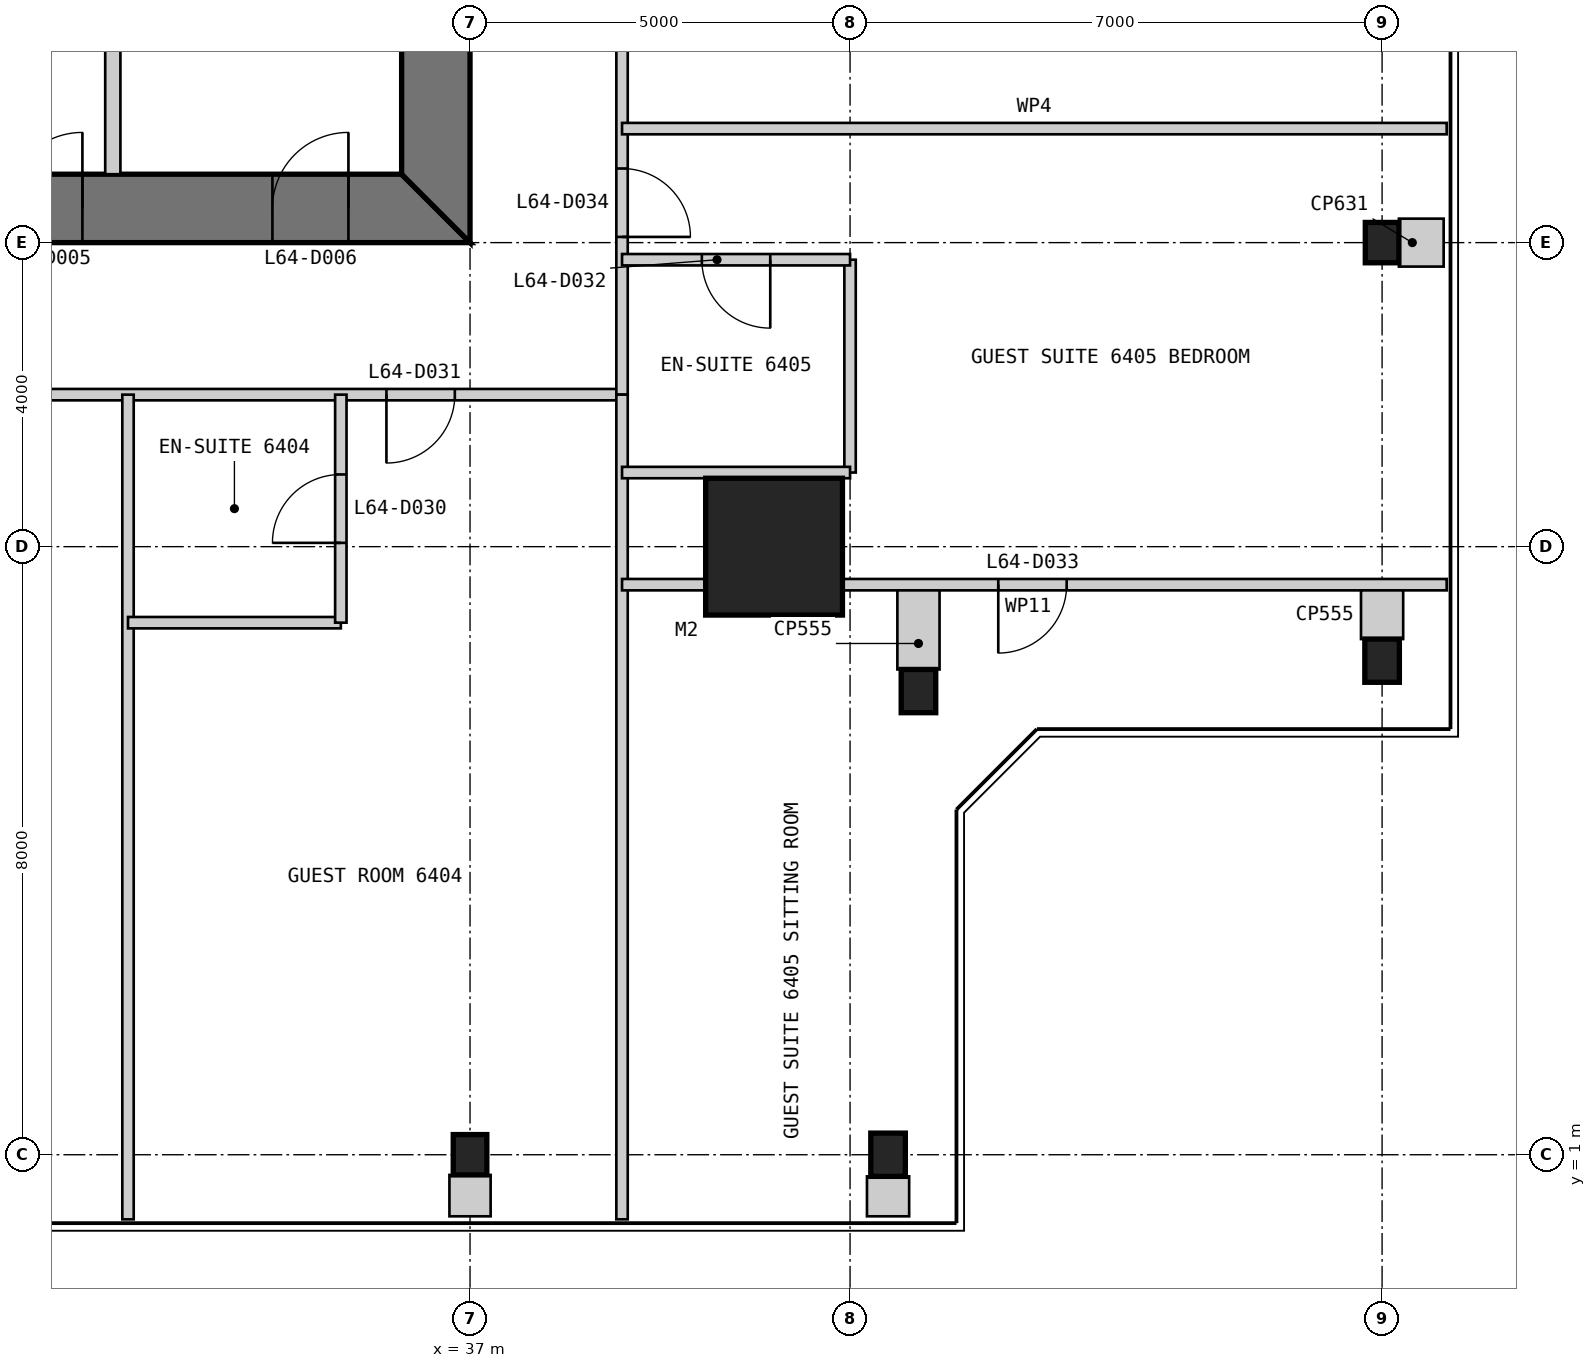
"""IFC4 building model, lengths in metres.
Left out: names, types, materials, properties, quantities, classifications, styles, units other than length and angle.
Written with IfcOpenShell. Run it as: python <this file> out.ifc"""

import sys

from ifc_helpers import new_model, si_unit, direction, frame, frame_2d, origin, origin_2d, place, context, subcontext, project, spatial, polyline, rectangle, i_section, outline, extrude, element, fill, save


model = new_model("IFC4")
c1 = context("Model", 3, precision=1e-05, world=origin(), true_north=direction((0.0, 1.0)))
c2 = subcontext(c1, "Body", "Model", "MODEL_VIEW")
j1 = project(units=[si_unit("LENGTHUNIT", "METRE"), si_unit("PLANEANGLEUNIT", "RADIAN")], contexts=[c1])
p1 = place(None, origin())
s1 = spatial("IfcSite", under=j1, at=p1, CompositionType="ELEMENT")
p2 = place(p1, origin())
s2 = spatial("IfcBuilding", under=s1, at=p2, CompositionType="ELEMENT")
p3 = place(p2, frame((0.0, 0.0, 269.6)))
s3 = spatial("IfcBuildingStorey", under=s2, at=p3, CompositionType="ELEMENT", Elevation=269.6)
p4 = place(p3, frame((41.0, 9.0, 0.0), z_axis=(0.0, 0.0, 1.0), x_axis=(1.0, 0.0, 0.0)))
e1 = element("IfcColumn", 1, at=p4, inside=s3, PredefinedType="COLUMN", context=c2, shape_type="SweptSolid", body=[
    extrude(rectangle(XDim=1.8, YDim=1.8, at=origin_2d()), origin(), (0.0, 0.0, 1.0), 3.4),
])
p5 = place(p3, frame((37.0, 1.0, 0.0), z_axis=(0.0, 0.0, 1.0), x_axis=(1.0, 0.0, 0.0)))
e2 = element("IfcColumn", 2, at=p5, inside=s3, PredefinedType="COLUMN", context=c2, shape_type="SweptSolid", body=[
    extrude(i_section(OverallWidth=0.442, OverallDepth=0.531, WebThickness=0.066, FlangeThickness=0.106, at=origin_2d()), origin(), (0.0, 0.0, 1.0), 3.4),
])
for number, where, z_axis, x_axis in (
    (3, (42.5, 1.0, 0.0), (0.0, 0.0, 1.0), (1.0, 0.0, 0.0)),
    (4, (42.9, 7.1, 0.0), (0.0, 0.0, 1.0), (1.0, 0.0, 0.0)),
    (5, (49.0, 7.5, 0.0), (0.0, 0.0, 1.0), (1.0, 0.0, 0.0)),
):
    element("IfcColumn", number, at=place(p3, frame(where, z_axis=z_axis, x_axis=x_axis)), inside=s3, PredefinedType="COLUMN", context=c2, shape_type="SweptSolid", body=[
        extrude(i_section(OverallWidth=0.455, OverallDepth=0.569, WebThickness=0.078, FlangeThickness=0.125, at=origin_2d()), origin(), (0.0, 0.0, 1.0), 3.4),
    ])
p6 = place(p3, frame((49.0, 13.0, 0.0), z_axis=(0.0, 0.0, 1.0), x_axis=(1.0, 0.0, 0.0)))
e6 = element("IfcColumn", 6, at=p6, inside=s3, PredefinedType="COLUMN", context=c2, shape_type="SweptSolid", body=[
    extrude(i_section(OverallWidth=0.442, OverallDepth=0.531, WebThickness=0.066, FlangeThickness=0.106, at=origin_2d()), origin(), (0.0, 0.0, 1.0), 3.4),
])
p7 = place(p3, frame((13.0, 13.45, 0.0), z_axis=(0.0, 0.0, 1.0), x_axis=(1.0, 0.0, 0.0)))
e7 = element("IfcWall", 7, at=p7, inside=s3, PredefinedType="SHEAR", context=c2, shape_type="SweptSolid", body=[
    extrude(outline(polyline([(0.0, -0.45), (24.0, -0.45), (23.1, 0.45), (0.9, 0.45), (0.0, -0.45)])), origin(), (0.0, 0.0, 1.0), 3.4),
])
p8 = place(p7, frame((4.9, 0.0, 0.0)))
e8 = element("IfcOpeningElement", 8, at=p8, cuts=e7, PredefinedType="OPENING", context=c2, shape_type="SweptSolid", body=[
    extrude(rectangle(XDim=1.0, YDim=2.2, at=frame_2d((0.5, 1.1))), frame((0.0, 0.46, 0.0), z_axis=(0.0, -1.0, 0.0), x_axis=(1.0, 0.0, 0.0)), (0.0, 0.0, 1.0), 0.92),
])
p9 = place(p7, frame((8.9, 0.0, 0.0)))
e9 = element("IfcOpeningElement", 9, at=p9, cuts=e7, PredefinedType="OPENING", context=c2, shape_type="SweptSolid", body=[
    extrude(rectangle(XDim=1.1, YDim=2.2, at=frame_2d((0.55, 1.1))), frame((0.0, 0.46, 0.0), z_axis=(0.0, -1.0, 0.0), x_axis=(1.0, 0.0, 0.0)), (0.0, 0.0, 1.0), 0.92),
])
p10 = place(p7, frame((15.05, 0.0, 0.0)))
e10 = element("IfcOpeningElement", 10, at=p10, cuts=e7, PredefinedType="OPENING", context=c2, shape_type="SweptSolid", body=[
    extrude(rectangle(XDim=0.9, YDim=2.2, at=frame_2d((0.45, 1.1))), frame((0.0, 0.46, 0.0), z_axis=(0.0, -1.0, 0.0), x_axis=(1.0, 0.0, 0.0)), (0.0, 0.0, 1.0), 0.92),
])
p11 = place(p7, frame((17.9, 0.0, 0.0)))
e11 = element("IfcOpeningElement", 11, at=p11, cuts=e7, PredefinedType="OPENING", context=c2, shape_type="SweptSolid", body=[
    extrude(rectangle(XDim=1.0, YDim=2.2, at=frame_2d((0.5, 1.1))), frame((0.0, 0.46, 0.0), z_axis=(0.0, -1.0, 0.0), x_axis=(1.0, 0.0, 0.0)), (0.0, 0.0, 1.0), 0.92),
])
p12 = place(p7, frame((21.4, 0.0, 0.0)))
e12 = element("IfcOpeningElement", 12, at=p12, cuts=e7, PredefinedType="OPENING", context=c2, shape_type="SweptSolid", body=[
    extrude(rectangle(XDim=1.0, YDim=2.2, at=frame_2d((0.5, 1.1))), frame((0.0, 0.46, 0.0), z_axis=(0.0, -1.0, 0.0), x_axis=(1.0, 0.0, 0.0)), (0.0, 0.0, 1.0), 0.92),
])
p13 = place(p3, frame((36.55, 13.9, 0.0), z_axis=(0.0, 0.0, 1.0), x_axis=(0.0, 1.0, 0.0)))
e13 = element("IfcWall", 13, at=p13, inside=s3, PredefinedType="SHEAR", context=c2, shape_type="SweptSolid", body=[
    extrude(outline(polyline([(-0.9, -0.45), (23.1, -0.45), (22.2, 0.45), (0.0, 0.45), (-0.9, -0.45)])), origin(), (0.0, 0.0, 1.0), 3.4),
])
p14 = place(p13, frame((20.2, 0.0, 0.0)))
e14 = element("IfcOpeningElement", 14, at=p14, cuts=e13, PredefinedType="OPENING", context=c2, shape_type="SweptSolid", body=[
    extrude(rectangle(XDim=1.0, YDim=2.2, at=frame_2d((0.5, 1.1))), frame((0.0, 0.46, 0.0), z_axis=(0.0, -1.0, 0.0), x_axis=(1.0, 0.0, 0.0)), (0.0, 0.0, 1.0), 0.92),
])
p15 = place(p13, frame((17.25, 0.0, 0.0)))
e15 = element("IfcOpeningElement", 15, at=p15, cuts=e13, PredefinedType="OPENING", context=c2, shape_type="SweptSolid", body=[
    extrude(rectangle(XDim=0.9, YDim=2.2, at=frame_2d((0.45, 1.1))), frame((0.0, 0.46, 0.0), z_axis=(0.0, -1.0, 0.0), x_axis=(1.0, 0.0, 0.0)), (0.0, 0.0, 1.0), 0.92),
])
p16 = place(p3, frame((32.3, 13.9, 0.0), z_axis=(0.0, 0.0, 1.0), x_axis=(0.0, 1.0, 0.0)))
e16 = element("IfcWall", 16, at=p16, inside=s3, PredefinedType="PARTITIONING", context=c2, shape_type="SweptSolid", body=[
    extrude(rectangle(XDim=6.1, YDim=0.2, at=frame_2d((3.05, 0.0))), origin(), (0.0, 0.0, 1.0), 3.2),
])
p17 = place(p3, frame((11.0, 11.0, 0.0), z_axis=(0.0, 0.0, 1.0), x_axis=(1.0, 0.0, 0.0)))
e17 = element("IfcWall", 17, at=p17, inside=s3, PredefinedType="PARTITIONING", context=c2, shape_type="SweptSolid", body=[
    extrude(rectangle(XDim=28.0, YDim=0.15, at=frame_2d((14.0, 0.0))), origin(), (0.0, 0.0, 1.0), 2.844),
])
p18 = place(p17, frame((1.9, 0.0, 0.0)))
e18 = element("IfcOpeningElement", 18, at=p18, cuts=e17, PredefinedType="OPENING", context=c2, shape_type="SweptSolid", body=[
    extrude(rectangle(XDim=0.9, YDim=2.1, at=frame_2d((0.45, 1.05))), frame((0.0, 0.085, 0.0), z_axis=(0.0, -1.0, 0.0), x_axis=(1.0, 0.0, 0.0)), (0.0, 0.0, 1.0), 0.17),
])
p19 = place(p17, frame((4.7, 0.0, 0.0)))
e19 = element("IfcOpeningElement", 19, at=p19, cuts=e17, PredefinedType="OPENING", context=c2, shape_type="SweptSolid", body=[
    extrude(rectangle(XDim=1.0, YDim=2.1, at=frame_2d((0.5, 1.05))), frame((0.0, 0.085, 0.0), z_axis=(0.0, -1.0, 0.0), x_axis=(1.0, 0.0, 0.0)), (0.0, 0.0, 1.0), 0.17),
])
p20 = place(p17, frame((13.3, 0.0, 0.0)))
e20 = element("IfcOpeningElement", 20, at=p20, cuts=e17, PredefinedType="OPENING", context=c2, shape_type="SweptSolid", body=[
    extrude(rectangle(XDim=0.9, YDim=2.1, at=frame_2d((0.45, 1.05))), frame((0.0, 0.085, 0.0), z_axis=(0.0, -1.0, 0.0), x_axis=(1.0, 0.0, 0.0)), (0.0, 0.0, 1.0), 0.17),
])
p21 = place(p17, frame((24.9, 0.0, 0.0)))
e21 = element("IfcOpeningElement", 21, at=p21, cuts=e17, PredefinedType="OPENING", context=c2, shape_type="SweptSolid", body=[
    extrude(rectangle(XDim=0.9, YDim=2.1, at=frame_2d((0.45, 1.05))), frame((0.0, 0.085, 0.0), z_axis=(0.0, -1.0, 0.0), x_axis=(1.0, 0.0, 0.0)), (0.0, 0.0, 1.0), 0.17),
])
p22 = place(p3, frame((32.5, 0.15, 0.0), z_axis=(0.0, 0.0, 1.0), x_axis=(0.0, 1.0, 0.0)))
e22 = element("IfcWall", 22, at=p22, inside=s3, PredefinedType="PARTITIONING", context=c2, shape_type="SweptSolid", body=[
    extrude(rectangle(XDim=10.85, YDim=0.15, at=frame_2d((5.425, 0.0))), origin(), (0.0, 0.0, 1.0), 3.25),
])
p23 = place(p3, frame((32.5, 8.0, 0.0), z_axis=(0.0, 0.0, 1.0), x_axis=(1.0, 0.0, 0.0)))
e23 = element("IfcWall", 23, at=p23, inside=s3, PredefinedType="PARTITIONING", context=c2, shape_type="SweptSolid", body=[
    extrude(rectangle(XDim=2.8, YDim=0.15, at=frame_2d((1.4, 0.0))), origin(), (0.0, 0.0, 1.0), 3.25),
])
p24 = place(p3, frame((35.3, 8.0, 0.0), z_axis=(0.0, 0.0, 1.0), x_axis=(0.0, 1.0, 0.0)))
e24 = element("IfcWall", 24, at=p24, inside=s3, PredefinedType="PARTITIONING", context=c2, shape_type="SweptSolid", body=[
    extrude(rectangle(XDim=3.0, YDim=0.15, at=frame_2d((1.5, 0.0))), origin(), (0.0, 0.0, 1.0), 3.25),
])
p25 = place(p24, frame((1.05, 0.0, 0.0)))
e25 = element("IfcOpeningElement", 25, at=p25, cuts=e24, PredefinedType="OPENING", context=c2, shape_type="SweptSolid", body=[
    extrude(rectangle(XDim=0.9, YDim=2.1, at=frame_2d((0.45, 1.05))), frame((0.0, 0.085, 0.0), z_axis=(0.0, -1.0, 0.0), x_axis=(1.0, 0.0, 0.0)), (0.0, 0.0, 1.0), 0.17),
])
p26 = place(p3, frame((39.0, 11.0, 0.0), z_axis=(0.0, 0.0, 1.0), x_axis=(0.0, 1.0, 0.0)))
e26 = element("IfcWall", 26, at=p26, inside=s3, PredefinedType="PARTITIONING", context=c2, shape_type="SweptSolid", body=[
    extrude(rectangle(XDim=28.0, YDim=0.15, at=frame_2d((14.0, 0.0))), origin(), (0.0, 0.0, 1.0), 2.844),
])
p27 = place(p26, frame((2.075, 0.0, 0.0)))
e27 = element("IfcOpeningElement", 27, at=p27, cuts=e26, PredefinedType="OPENING", context=c2, shape_type="SweptSolid", body=[
    extrude(rectangle(XDim=0.9, YDim=2.1, at=frame_2d((0.45, 1.05))), frame((0.0, 0.085, 0.0), z_axis=(0.0, -1.0, 0.0), x_axis=(1.0, 0.0, 0.0)), (0.0, 0.0, 1.0), 0.17),
])
p28 = place(p26, frame((5.2, 0.0, 0.0)))
e28 = element("IfcOpeningElement", 28, at=p28, cuts=e26, PredefinedType="OPENING", context=c2, shape_type="SweptSolid", body=[
    extrude(rectangle(XDim=0.9, YDim=2.1, at=frame_2d((0.45, 1.05))), frame((0.0, 0.085, 0.0), z_axis=(0.0, -1.0, 0.0), x_axis=(1.0, 0.0, 0.0)), (0.0, 0.0, 1.0), 0.17),
])
p29 = place(p26, frame((13.3, 0.0, 0.0)))
e29 = element("IfcOpeningElement", 29, at=p29, cuts=e26, PredefinedType="OPENING", context=c2, shape_type="SweptSolid", body=[
    extrude(rectangle(XDim=0.9, YDim=2.1, at=frame_2d((0.45, 1.05))), frame((0.0, 0.085, 0.0), z_axis=(0.0, -1.0, 0.0), x_axis=(1.0, 0.0, 0.0)), (0.0, 0.0, 1.0), 0.17),
])
p30 = place(p26, frame((24.9, 0.0, 0.0)))
e30 = element("IfcOpeningElement", 30, at=p30, cuts=e26, PredefinedType="OPENING", context=c2, shape_type="SweptSolid", body=[
    extrude(rectangle(XDim=0.9, YDim=2.1, at=frame_2d((0.45, 1.05))), frame((0.0, 0.085, 0.0), z_axis=(0.0, -1.0, 0.0), x_axis=(1.0, 0.0, 0.0)), (0.0, 0.0, 1.0), 0.17),
])
p31 = place(p3, frame((39.0, 0.15, 0.0), z_axis=(0.0, 0.0, 1.0), x_axis=(0.0, 1.0, 0.0)))
e31 = element("IfcWall", 31, at=p31, inside=s3, PredefinedType="PARTITIONING", context=c2, shape_type="SweptSolid", body=[
    extrude(rectangle(XDim=10.85, YDim=0.15, at=frame_2d((5.425, 0.0))), origin(), (0.0, 0.0, 1.0), 2.844),
])
p32 = place(p3, frame((42.0, 9.975, 0.0), z_axis=(0.0, 0.0, 1.0), x_axis=(0.0, 1.0, 0.0)))
e32 = element("IfcWall", 32, at=p32, inside=s3, PredefinedType="PARTITIONING", context=c2, shape_type="SweptSolid", body=[
    extrude(rectangle(XDim=2.8, YDim=0.15, at=frame_2d((1.4, 0.0))), origin(), (0.0, 0.0, 1.0), 3.25),
])
p33 = place(p3, frame((42.0, 12.775, 0.0), z_axis=(0.0, 0.0, 1.0), x_axis=(-1.0, 0.0, 0.0)))
e33 = element("IfcWall", 33, at=p33, inside=s3, PredefinedType="PARTITIONING", context=c2, shape_type="SweptSolid", body=[
    extrude(rectangle(XDim=3.0, YDim=0.15, at=frame_2d((1.5, 0.0))), origin(), (0.0, 0.0, 1.0), 3.25),
])
p34 = place(p33, frame((1.05, 0.0, 0.0)))
e34 = element("IfcOpeningElement", 34, at=p34, cuts=e33, PredefinedType="OPENING", context=c2, shape_type="SweptSolid", body=[
    extrude(rectangle(XDim=0.9, YDim=2.1, at=frame_2d((0.45, 1.05))), frame((0.0, 0.085, 0.0), z_axis=(0.0, -1.0, 0.0), x_axis=(1.0, 0.0, 0.0)), (0.0, 0.0, 1.0), 0.17),
])
p35 = place(p3, frame((42.0, 9.975, 0.0), z_axis=(0.0, 0.0, 1.0), x_axis=(-1.0, 0.0, 0.0)))
e35 = element("IfcWall", 35, at=p35, inside=s3, PredefinedType="PARTITIONING", context=c2, shape_type="SweptSolid", body=[
    extrude(rectangle(XDim=3.0, YDim=0.15, at=frame_2d((1.5, 0.0))), origin(), (0.0, 0.0, 1.0), 3.25),
])
p36 = place(p3, frame((49.85, 8.5, 0.0), z_axis=(0.0, 0.0, 1.0), x_axis=(-1.0, 0.0, 0.0)))
e36 = element("IfcWall", 36, at=p36, inside=s3, PredefinedType="PARTITIONING", context=c2, shape_type="SweptSolid", body=[
    extrude(rectangle(XDim=10.85, YDim=0.15, at=frame_2d((5.425, 0.0))), origin(), (0.0, 0.0, 1.0), 3.25),
])
p37 = place(p36, frame((5.0, 0.0, 0.0)))
e37 = element("IfcOpeningElement", 37, at=p37, cuts=e36, PredefinedType="OPENING", context=c2, shape_type="SweptSolid", body=[
    extrude(rectangle(XDim=0.9, YDim=2.1, at=frame_2d((0.45, 1.05))), frame((0.0, 0.085, 0.0), z_axis=(0.0, -1.0, 0.0), x_axis=(1.0, 0.0, 0.0)), (0.0, 0.0, 1.0), 0.17),
])
p38 = place(p3, frame((49.85, 14.5, 0.0), z_axis=(0.0, 0.0, 1.0), x_axis=(-1.0, 0.0, 0.0)))
e38 = element("IfcWall", 38, at=p38, inside=s3, PredefinedType="PARTITIONING", context=c2, shape_type="SweptSolid", body=[
    extrude(rectangle(XDim=10.85, YDim=0.15, at=frame_2d((5.425, 0.0))), origin(), (0.0, 0.0, 1.0), 3.25),
])
p39 = place(p3, frame((37.0, 0.19, 0.0), z_axis=(0.0, 0.0, 1.0), x_axis=(0.0, 1.0, 0.0)))
e39 = element("IfcWall", 39, at=p39, inside=s3, PredefinedType="PARTITIONING", context=c2, shape_type="SweptSolid", body=[
    extrude(rectangle(XDim=0.545, YDim=0.542, at=frame_2d((0.272, 0.0))), origin(), (0.0, 0.0, 1.0), 3.25),
])
p40 = place(p3, frame((42.5, 0.19, 0.0), z_axis=(0.0, 0.0, 1.0), x_axis=(0.0, 1.0, 0.0)))
e40 = element("IfcWall", 40, at=p40, inside=s3, PredefinedType="PARTITIONING", context=c2, shape_type="SweptSolid", body=[
    extrude(rectangle(XDim=0.526, YDim=0.555, at=frame_2d((0.263, 0.0))), origin(), (0.0, 0.0, 1.0), 3.25),
])
p41 = place(p3, frame((42.9, 8.425, 0.0), z_axis=(0.0, 0.0, 1.0), x_axis=(0.0, -1.0, 0.0)))
e41 = element("IfcWall", 41, at=p41, inside=s3, PredefinedType="PARTITIONING", context=c2, shape_type="SweptSolid", body=[
    extrude(rectangle(XDim=1.041, YDim=0.555, at=frame_2d((0.52, 0.0))), origin(), (0.0, 0.0, 1.0), 3.25),
])
p42 = place(p3, frame((49.0, 8.425, 0.0), z_axis=(0.0, 0.0, 1.0), x_axis=(0.0, -1.0, 0.0)))
e42 = element("IfcWall", 42, at=p42, inside=s3, PredefinedType="PARTITIONING", context=c2, shape_type="SweptSolid", body=[
    extrude(rectangle(XDim=0.641, YDim=0.555, at=frame_2d((0.32, 0.0))), origin(), (0.0, 0.0, 1.0), 2.338),
])
p43 = place(p3, frame((49.81, 13.0, 0.0), z_axis=(0.0, 0.0, 1.0), x_axis=(-1.0, 0.0, 0.0)))
e43 = element("IfcWall", 43, at=p43, inside=s3, PredefinedType="PARTITIONING", context=c2, shape_type="SweptSolid", body=[
    extrude(rectangle(XDim=0.589, YDim=0.631, at=frame_2d((0.294, 0.0))), origin(), (0.0, 0.0, 1.0), 3.25),
])
p44 = place(p11, origin())
e44 = element("IfcDoor", 44, at=p44, inside=s3, OperationType="SINGLE_SWING_RIGHT", PredefinedType="DOOR", context=c2, shape_type="SweptSolid", body=[
    extrude(rectangle(XDim=1.0, YDim=2.2, at=frame_2d((0.5, 1.1))), frame((0.0, 0.025, 0.0), z_axis=(0.0, -1.0, 0.0), x_axis=(1.0, 0.0, 0.0)), (0.0, 0.0, 1.0), 0.05),
    extrude(outline(polyline([(0.0, 0.0), (0.04, 0.0), (0.04, 2.16), (0.96, 2.16), (0.96, 0.0), (1.0, 0.0), (1.0, 2.2), (0.0, 2.2), (0.0, 0.0)])), frame((0.0, 0.3, 0.0), z_axis=(0.0, -1.0, 0.0), x_axis=(1.0, 0.0, 0.0)), (0.0, 0.0, 1.0), 0.6),
])
fill(e11, e44)
p45 = place(p12, origin())
e45 = element("IfcDoor", 45, at=p45, inside=s3, OperationType="SINGLE_SWING_RIGHT", PredefinedType="DOOR", context=c2, shape_type="SweptSolid", body=[
    extrude(rectangle(XDim=1.0, YDim=2.2, at=frame_2d((0.5, 1.1))), frame((0.0, 0.025, 0.0), z_axis=(0.0, -1.0, 0.0), x_axis=(1.0, 0.0, 0.0)), (0.0, 0.0, 1.0), 0.05),
    extrude(outline(polyline([(0.0, 0.0), (0.04, 0.0), (0.04, 2.16), (0.96, 2.16), (0.96, 0.0), (1.0, 0.0), (1.0, 2.2), (0.0, 2.2), (0.0, 0.0)])), frame((0.0, 0.3, 0.0), z_axis=(0.0, -1.0, 0.0), x_axis=(1.0, 0.0, 0.0)), (0.0, 0.0, 1.0), 0.6),
])
fill(e12, e45)
p46 = place(p25, origin())
e46 = element("IfcDoor", 46, at=p46, inside=s3, OperationType="SINGLE_SWING_LEFT", PredefinedType="DOOR", context=c2, shape_type="SweptSolid", body=[
    extrude(rectangle(XDim=0.9, YDim=2.1, at=frame_2d((0.45, 1.05))), frame((0.0, 0.025, 0.0), z_axis=(0.0, -1.0, 0.0), x_axis=(1.0, 0.0, 0.0)), (0.0, 0.0, 1.0), 0.05),
])
fill(e25, e46)
p47 = place(p21, frame((0.9, 0.0, 0.0), z_axis=(0.0, 0.0, 1.0), x_axis=(-1.0, 0.0, 0.0)))
e47 = element("IfcDoor", 47, at=p47, inside=s3, OperationType="SINGLE_SWING_RIGHT", PredefinedType="DOOR", context=c2, shape_type="SweptSolid", body=[
    extrude(rectangle(XDim=0.9, YDim=2.1, at=frame_2d((0.45, 1.05))), frame((0.0, 0.025, 0.0), z_axis=(0.0, -1.0, 0.0), x_axis=(1.0, 0.0, 0.0)), (0.0, 0.0, 1.0), 0.05),
])
fill(e21, e47)
p48 = place(p34, origin())
e48 = element("IfcDoor", 48, at=p48, inside=s3, OperationType="SINGLE_SWING_LEFT", PredefinedType="DOOR", context=c2, shape_type="SweptSolid", body=[
    extrude(rectangle(XDim=0.9, YDim=2.1, at=frame_2d((0.45, 1.05))), frame((0.0, 0.025, 0.0), z_axis=(0.0, -1.0, 0.0), x_axis=(1.0, 0.0, 0.0)), (0.0, 0.0, 1.0), 0.05),
])
fill(e34, e48)
p49 = place(p37, origin())
e49 = element("IfcDoor", 49, at=p49, inside=s3, OperationType="SINGLE_SWING_RIGHT", PredefinedType="DOOR", context=c2, shape_type="SweptSolid", body=[
    extrude(rectangle(XDim=0.9, YDim=2.1, at=frame_2d((0.45, 1.05))), frame((0.0, 0.025, 0.0), z_axis=(0.0, -1.0, 0.0), x_axis=(1.0, 0.0, 0.0)), (0.0, 0.0, 1.0), 0.05),
])
fill(e37, e49)
p50 = place(p27, frame((0.9, 0.0, 0.0), z_axis=(0.0, 0.0, 1.0), x_axis=(-1.0, 0.0, 0.0)))
e50 = element("IfcDoor", 50, at=p50, inside=s3, OperationType="SINGLE_SWING_RIGHT", PredefinedType="DOOR", context=c2, shape_type="SweptSolid", body=[
    extrude(rectangle(XDim=0.9, YDim=2.1, at=frame_2d((0.45, 1.05))), frame((0.0, 0.025, 0.0), z_axis=(0.0, -1.0, 0.0), x_axis=(1.0, 0.0, 0.0)), (0.0, 0.0, 1.0), 0.05),
])
fill(e27, e50)
save(model, sys.argv[1])
